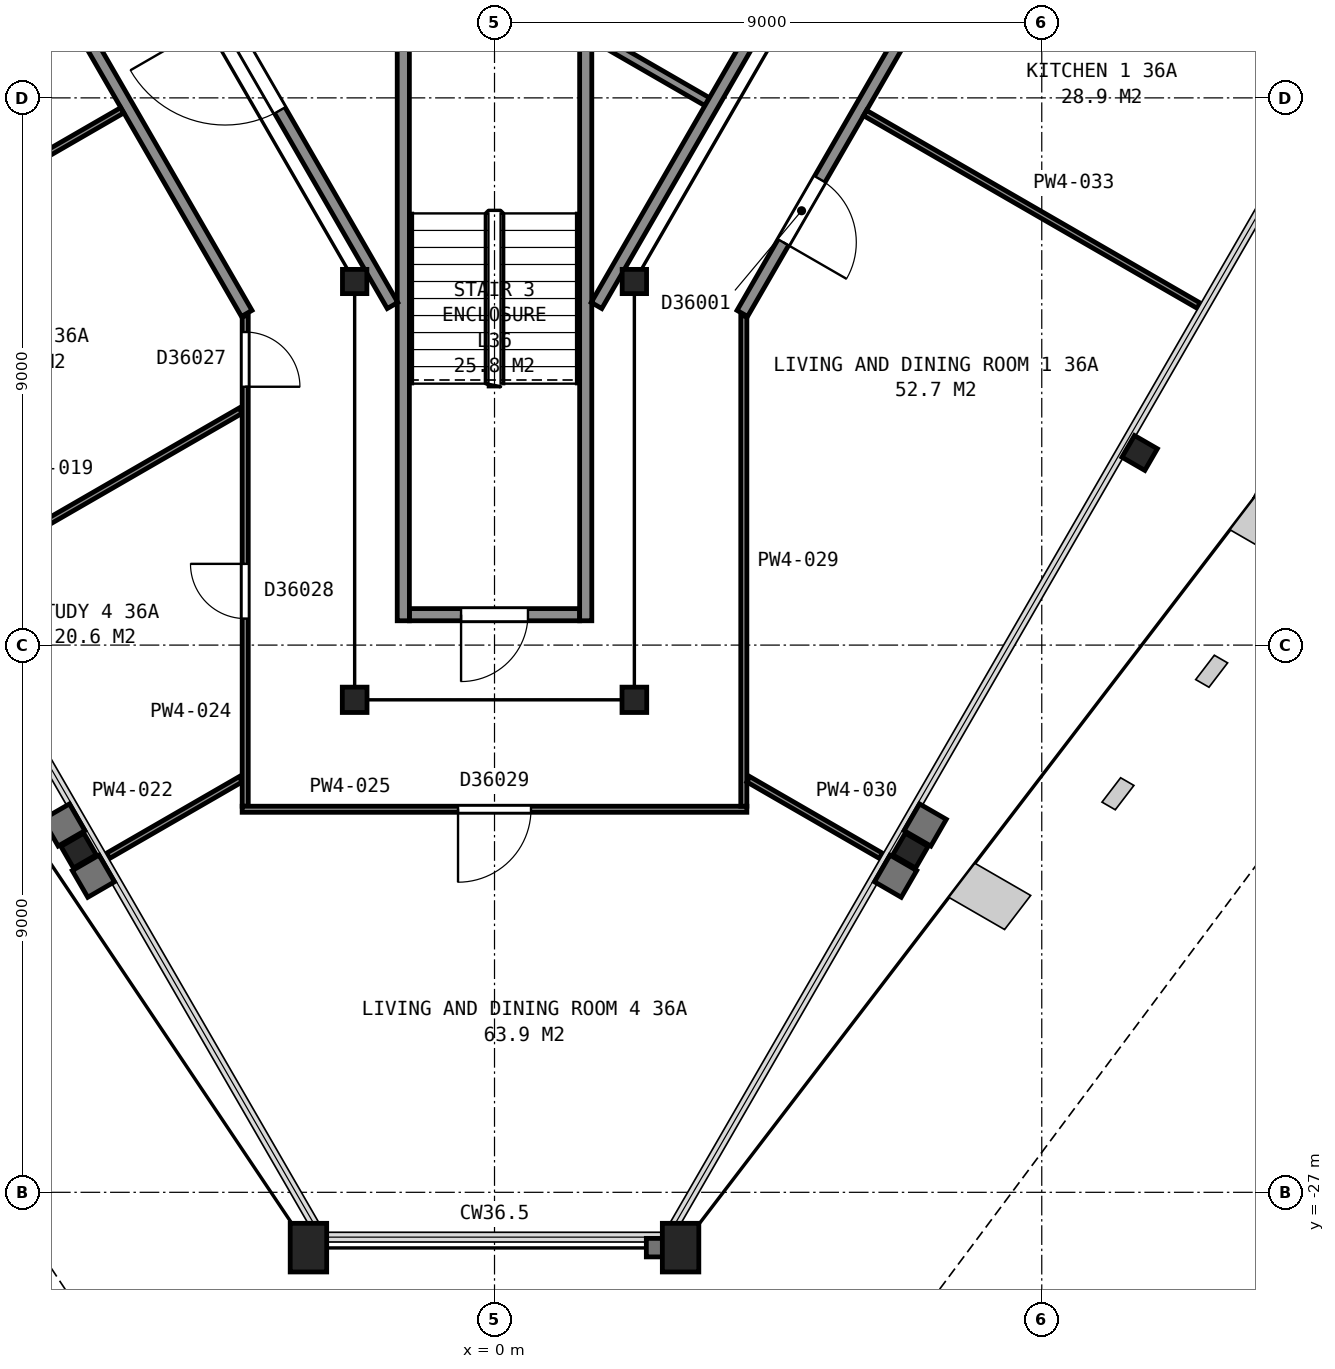
"""IFC4 building model, lengths in metres.
Left out: names, types, materials, properties, quantities, classifications, styles, units other than length and angle.
Written with IfcOpenShell. Run it as: python <this file> out.ifc"""

import sys

from ifc_helpers import new_model, si_unit, direction, frame, frame_2d, origin, origin_2d, place, context, subcontext, project, spatial, rectangle, hollow_rectangle, i_section, extrude, element, fill, save


model = new_model("IFC4")
c1 = context("Model", 3, precision=1e-05, world=origin(), true_north=direction((0.0, 1.0)))
c2 = subcontext(c1, "Body", "Model", "MODEL_VIEW")
j1 = project(units=[si_unit("LENGTHUNIT", "METRE"), si_unit("PLANEANGLEUNIT", "RADIAN")], contexts=[c1])
p1 = place(None, origin())
s1 = spatial("IfcSite", under=j1, at=p1, CompositionType="ELEMENT")
p2 = place(p1, origin())
s2 = spatial("IfcBuilding", under=s1, at=p2, CompositionType="ELEMENT")
p3 = place(p2, frame((0.0, 0.0, 148.8)))
s3 = spatial("IfcBuildingStorey", under=s2, at=p3, CompositionType="ELEMENT", Elevation=148.8)
p4 = place(p3, frame((-6.84, -21.38, 0.0), z_axis=(0.0, 0.0, 1.0), x_axis=(-0.5, 0.866025403784, 0.0)))
e1 = element("IfcColumn", 1, at=p4, inside=s3, PredefinedType="COLUMN", context=c2, shape_type="SweptSolid", body=[
    extrude(i_section(OverallWidth=0.411, OverallDepth=0.434, WebThickness=0.036, FlangeThickness=0.057, FilletRadius=0.015, at=origin_2d()), origin(), (0.0, 0.0, 1.0), 3.7),
])
for number, where, z_axis, x_axis in (
    (2, (-3.06, -27.91, 0.0), (0.0, 0.0, 1.0), (-1.0, 0.0, 0.0)),
    (3, (3.06, -27.91, 0.0), (0.0, 0.0, 1.0), (-1.0, 0.0, 0.0)),
):
    element("IfcColumn", number, at=place(p3, frame(where, z_axis=z_axis, x_axis=x_axis)), inside=s3, PredefinedType="COLUMN", context=c2, shape_type="SweptSolid", body=[
        extrude(hollow_rectangle(XDim=0.6, YDim=0.8, WallThickness=0.05, at=origin_2d()), origin(), (0.0, 0.0, 1.0), 3.7),
    ])
for number, where, z_axis, x_axis in (
    (4, (6.84, -21.38, 0.0), (0.0, 0.0, 1.0), (-0.5, -0.866, 0.0)),
    (5, (10.61, -14.84, 0.0), (0.0, 0.0, 1.0), (-0.5, -0.866, 0.0)),
):
    element("IfcColumn", number, at=place(p3, frame(where, z_axis=z_axis, x_axis=x_axis)), inside=s3, PredefinedType="COLUMN", context=c2, shape_type="SweptSolid", body=[
        extrude(i_section(OverallWidth=0.411, OverallDepth=0.434, WebThickness=0.036, FlangeThickness=0.057, FilletRadius=0.015, at=origin_2d()), origin(), (0.0, 0.0, 1.0), 3.7),
    ])
p5 = place(p3, frame((-2.3, -12.02, 0.05), z_axis=(0.0, 0.0, 1.0), x_axis=(1.0, 0.0, 0.0)))
e6 = element("IfcColumn", 6, at=p5, inside=s3, PredefinedType="COLUMN", context=c2, shape_type="SweptSolid", body=[
    extrude(i_section(OverallWidth=0.401, OverallDepth=0.399, WebThickness=0.025, FlangeThickness=0.04, FilletRadius=0.015, at=origin_2d()), origin(), (0.0, 0.0, 1.0), 3.65),
])
for number, where, z_axis, x_axis in (
    (7, (-2.3, -18.9, 0.055), (0.0, 0.0, 1.0), (-1.0, 0.0, 0.0)),
    (8, (2.3, -18.9, 0.055), (0.0, 0.0, 1.0), (-1.0, 0.0, 0.0)),
):
    element("IfcColumn", number, at=place(p3, frame(where, z_axis=z_axis, x_axis=x_axis)), inside=s3, PredefinedType="COLUMN", context=c2, shape_type="SweptSolid", body=[
        extrude(i_section(OverallWidth=0.406, OverallDepth=0.417, WebThickness=0.03, FlangeThickness=0.048, FilletRadius=0.015, at=origin_2d()), origin(), (0.0, 0.0, 1.0), 3.645),
    ])
p6 = place(p3, frame((2.3, -12.02, 0.05), z_axis=(0.0, 0.0, 1.0), x_axis=(1.0, 0.0, 0.0)))
e9 = element("IfcColumn", 9, at=p6, inside=s3, PredefinedType="COLUMN", context=c2, shape_type="SweptSolid", body=[
    extrude(i_section(OverallWidth=0.401, OverallDepth=0.399, WebThickness=0.025, FlangeThickness=0.04, FilletRadius=0.015, at=origin_2d()), origin(), (0.0, 0.0, 1.0), 3.65),
])
p7 = place(p3, frame((-1.4, -17.5, 0.0), z_axis=(0.0, 0.0, 1.0), x_axis=(1.0, 0.0, 0.0)))
e10 = element("IfcWall", 10, at=p7, inside=s3, PredefinedType="PARTITIONING", context=c2, shape_type="SweptSolid", body=[
    extrude(rectangle(XDim=2.8, YDim=0.2, at=frame_2d((1.4, 0.0))), origin(), (0.0, 0.0, 1.0), 3.45),
])
p8 = place(p7, frame((0.85, 0.0, 0.0)))
e11 = element("IfcOpeningElement", 11, at=p8, cuts=e10, PredefinedType="OPENING", context=c2, shape_type="SweptSolid", body=[
    extrude(rectangle(XDim=1.1, YDim=2.1, at=frame_2d((0.55, 1.05))), frame((0.0, 0.11, 0.0), z_axis=(0.0, -1.0, 0.0), x_axis=(1.0, 0.0, 0.0)), (0.0, 0.0, 1.0), 0.22),
])
for number, where, z_axis, x_axis in (
    (12, (1.5, -8.0, 0.0), (0.0, 0.0, 1.0), (0.0, -1.0, 0.0)),
    (13, (-1.5, -8.0, 0.0), (0.0, 0.0, 1.0), (0.0, -1.0, 0.0)),
):
    element("IfcWall", number, at=place(p3, frame(where, z_axis=z_axis, x_axis=x_axis)), inside=s3, PredefinedType="PARTITIONING", context=c2, shape_type="SweptSolid", body=[
        extrude(rectangle(XDim=9.6, YDim=0.2, at=frame_2d((4.8, 0.0))), origin(), (0.0, 0.0, 1.0), 3.45),
    ])
p9 = place(p3, frame((-4.655, -7.257, 0.0), z_axis=(0.0, 0.0, 1.0), x_axis=(0.499966124405, -0.866044960985, 0.0)))
e14 = element("IfcWall", 14, at=p9, inside=s3, PredefinedType="PARTITIONING", context=c2, shape_type="SweptSolid", body=[
    extrude(rectangle(XDim=5.956, YDim=0.2, at=frame_2d((2.978, 0.0))), origin(), (0.0, 0.0, 1.0), 3.45),
])
p10 = place(p9, frame((0.45, 0.0, 0.0)))
e15 = element("IfcOpeningElement", 15, at=p10, cuts=e14, PredefinedType="OPENING", context=c2, shape_type="SweptSolid", body=[
    extrude(rectangle(XDim=1.8, YDim=2.1, at=frame_2d((0.9, 1.05))), frame((0.0, 0.11, 0.0), z_axis=(0.0, -1.0, 0.0), x_axis=(1.0, 0.0, 0.0)), (0.0, 0.0, 1.0), 0.22),
])
p11 = place(p3, frame((1.631, -7.986, 0.0), z_axis=(0.0, 0.0, 1.0), x_axis=(0.866038426532, -0.499977443261, 0.0)))
e16 = element("IfcWall", 16, at=p11, inside=s3, PredefinedType="PARTITIONING", context=c2, shape_type="SweptSolid", body=[
    extrude(rectangle(XDim=2.155, YDim=0.15, at=frame_2d((1.077, 0.0))), origin(), (0.0, 0.0, 1.0), 3.45),
])
p12 = place(p3, frame((1.677, -12.415, 0.0), z_axis=(0.0, 0.0, 1.0), x_axis=(0.500054337157, 0.865994029939, 0.0)))
e17 = element("IfcWall", 17, at=p12, inside=s3, PredefinedType="PARTITIONING", context=c2, shape_type="SweptSolid", body=[
    extrude(rectangle(XDim=6.177, YDim=0.2, at=frame_2d((3.088, 0.0))), origin(), (0.0, 0.0, 1.0), 3.45),
])
p13 = place(p3, frame((-4.075, -12.545, 0.0), z_axis=(0.0, 0.0, 1.0), x_axis=(-0.499999743747, 0.866025551732, 0.0)))
e18 = element("IfcWall", 18, at=p13, inside=s3, PredefinedType="PARTITIONING", context=c2, shape_type="SweptSolid", body=[
    extrude(rectangle(XDim=17.656, YDim=0.2, at=frame_2d((8.828, 0.0))), origin(), (0.0, 0.0, 1.0), 2.713),
])
p14 = place(p13, frame((10.08, 0.0, 0.0)))
e19 = element("IfcOpeningElement", 19, at=p14, cuts=e18, PredefinedType="OPENING", context=c2, shape_type="SweptSolid", body=[
    extrude(rectangle(XDim=0.9, YDim=2.1, at=frame_2d((0.45, 1.05))), frame((0.0, 0.11, 0.0), z_axis=(0.0, -1.0, 0.0), x_axis=(1.0, 0.0, 0.0)), (0.0, 0.0, 1.0), 0.22),
])
p15 = place(p13, frame((6.068, 0.0, 0.0)))
e20 = element("IfcOpeningElement", 20, at=p15, cuts=e18, PredefinedType="OPENING", context=c2, shape_type="SweptSolid", body=[
    extrude(rectangle(XDim=0.9, YDim=2.1, at=frame_2d((0.45, 1.05))), frame((0.0, 0.11, 0.0), z_axis=(0.0, -1.0, 0.0), x_axis=(1.0, 0.0, 0.0)), (0.0, 0.0, 1.0), 0.22),
])
p16 = place(p3, frame((-11.605, -12.37, 0.0), z_axis=(0.0, 0.0, 1.0), x_axis=(0.866017278078, 0.500014073873, 0.0)))
e21 = element("IfcWall", 21, at=p16, inside=s3, PredefinedType="PARTITIONING", context=c2, shape_type="SweptSolid", body=[
    extrude(rectangle(XDim=6.329, YDim=0.1, at=frame_2d((3.165, 0.0))), origin(), (0.0, 0.0, 1.0), 2.713),
])
p17 = place(p3, frame((-8.979, -16.918, 0.0), z_axis=(0.0, 0.0, 1.0), x_axis=(0.866046339293, 0.499963736882, 0.0)))
e22 = element("IfcWall", 22, at=p17, inside=s3, PredefinedType="PARTITIONING", context=c2, shape_type="SweptSolid", body=[
    extrude(rectangle(XDim=5.547, YDim=0.1, at=frame_2d((2.774, 0.0))), origin(), (0.0, 0.0, 1.0), 2.713),
])
p18 = place(p3, frame((-6.354, -21.465, 0.0), z_axis=(0.0, 0.0, 1.0), x_axis=(0.866061165757, 0.499938053331, 0.0)))
e23 = element("IfcWall", 23, at=p18, inside=s3, PredefinedType="PARTITIONING", context=c2, shape_type="SweptSolid", body=[
    extrude(rectangle(XDim=2.516, YDim=0.1, at=frame_2d((1.258, 0.0))), origin(), (0.0, 0.0, 1.0), 2.713),
])
p19 = place(p3, frame((-4.1, -20.65, 0.0), z_axis=(0.0, 0.0, 1.0), x_axis=(0.0, 1.0, 0.0)))
e24 = element("IfcWall", 24, at=p19, inside=s3, PredefinedType="PARTITIONING", context=c2, shape_type="SweptSolid", body=[
    extrude(rectangle(XDim=8.063, YDim=0.1, at=frame_2d((4.031, 0.0))), origin(), (0.0, 0.0, 1.0), 2.713),
])
p20 = place(p19, frame((6.899, 0.0, 0.0)))
e25 = element("IfcOpeningElement", 25, at=p20, cuts=e24, PredefinedType="OPENING", context=c2, shape_type="SweptSolid", body=[
    extrude(rectangle(XDim=0.9, YDim=2.1, at=frame_2d((0.45, 1.05))), frame((0.0, 0.06, 0.0), z_axis=(0.0, -1.0, 0.0), x_axis=(1.0, 0.0, 0.0)), (0.0, 0.0, 1.0), 0.12),
])
p21 = place(p19, frame((3.086, 0.0, 0.0)))
e26 = element("IfcOpeningElement", 26, at=p21, cuts=e24, PredefinedType="OPENING", context=c2, shape_type="SweptSolid", body=[
    extrude(rectangle(XDim=0.9, YDim=2.1, at=frame_2d((0.45, 1.05))), frame((0.0, 0.06, 0.0), z_axis=(0.0, -1.0, 0.0), x_axis=(1.0, 0.0, 0.0)), (0.0, 0.0, 1.0), 0.12),
])
p22 = place(p3, frame((4.15, -20.7, 0.0), z_axis=(0.0, 0.0, 1.0), x_axis=(-1.0, 0.0, 0.0)))
e27 = element("IfcWall", 27, at=p22, inside=s3, PredefinedType="PARTITIONING", context=c2, shape_type="SweptSolid", body=[
    extrude(rectangle(XDim=8.3, YDim=0.1, at=frame_2d((4.15, 0.0))), origin(), (0.0, 0.0, 1.0), 2.713),
])
p23 = place(p22, frame((3.55, 0.0, 0.0)))
e28 = element("IfcOpeningElement", 28, at=p23, cuts=e27, PredefinedType="OPENING", context=c2, shape_type="SweptSolid", body=[
    extrude(rectangle(XDim=1.2, YDim=2.1, at=frame_2d((0.6, 1.05))), frame((0.0, 0.06, 0.0), z_axis=(0.0, -1.0, 0.0), x_axis=(1.0, 0.0, 0.0)), (0.0, 0.0, 1.0), 0.12),
])
p24 = place(p3, frame((4.1, -20.65, 0.0), z_axis=(0.0, 0.0, 1.0), x_axis=(0.0, 1.0, 0.0)))
e29 = element("IfcWall", 29, at=p24, inside=s3, PredefinedType="PARTITIONING", context=c2, shape_type="SweptSolid", body=[
    extrude(rectangle(XDim=8.063, YDim=0.1, at=frame_2d((4.031, 0.0))), origin(), (0.0, 0.0, 1.0), 2.713),
])
p25 = place(p3, frame((4.175, -20.207, 0.0), z_axis=(0.0, 0.0, 1.0), x_axis=(0.866061165757, -0.499938053331, 0.0)))
e30 = element("IfcWall", 30, at=p25, inside=s3, PredefinedType="PARTITIONING", context=c2, shape_type="SweptSolid", body=[
    extrude(rectangle(XDim=2.516, YDim=0.1, at=frame_2d((1.258, 0.0))), origin(), (0.0, 0.0, 1.0), 2.713),
])
p26 = place(p3, frame((12.928, 2.789, 0.0), z_axis=(0.0, 0.0, 1.0), x_axis=(-0.499997769292, -0.86602669168, 0.0)))
e31 = element("IfcWall", 31, at=p26, inside=s3, PredefinedType="PARTITIONING", context=c2, shape_type="SweptSolid", body=[
    extrude(rectangle(XDim=17.706, YDim=0.2, at=frame_2d((8.853, 0.0))), origin(), (0.0, 0.0, 1.0), 2.713),
])
p27 = place(p26, frame((15.156, 0.0, 0.0)))
e32 = element("IfcOpeningElement", 32, at=p27, cuts=e31, PredefinedType="OPENING", context=c2, shape_type="SweptSolid", body=[
    extrude(rectangle(XDim=1.2, YDim=2.1, at=frame_2d((0.6, 1.05))), frame((0.0, 0.11, 0.0), z_axis=(0.0, -1.0, 0.0), x_axis=(1.0, 0.0, 0.0)), (0.0, 0.0, 1.0), 0.22),
])
p28 = place(p26, frame((11.042, 0.0, 0.0)))
e33 = element("IfcOpeningElement", 33, at=p28, cuts=e31, PredefinedType="OPENING", context=c2, shape_type="SweptSolid", body=[
    extrude(rectangle(XDim=0.9, YDim=2.1, at=frame_2d((0.45, 1.05))), frame((0.0, 0.11, 0.0), z_axis=(0.0, -1.0, 0.0), x_axis=(1.0, 0.0, 0.0)), (0.0, 0.0, 1.0), 0.22),
])
p29 = place(p26, frame((7.14, 0.0, 0.0)))
e34 = element("IfcOpeningElement", 34, at=p29, cuts=e31, PredefinedType="OPENING", context=c2, shape_type="SweptSolid", body=[
    extrude(rectangle(XDim=0.9, YDim=2.1, at=frame_2d((0.45, 1.05))), frame((0.0, 0.11, 0.0), z_axis=(0.0, -1.0, 0.0), x_axis=(1.0, 0.0, 0.0)), (0.0, 0.0, 1.0), 0.22),
])
p30 = place(p26, frame((0.515, 0.0, 0.0)))
e35 = element("IfcOpeningElement", 35, at=p30, cuts=e31, PredefinedType="OPENING", context=c2, shape_type="SweptSolid", body=[
    extrude(rectangle(XDim=0.9, YDim=2.1, at=frame_2d((0.45, 1.05))), frame((0.0, 0.11, 0.0), z_axis=(0.0, -1.0, 0.0), x_axis=(1.0, 0.0, 0.0)), (0.0, 0.0, 1.0), 0.22),
])
for number, where, z_axis, x_axis in (
    (36, (6.094, -9.249, 0.0), (0.0, 0.0, 1.0), (0.866, -0.5, 0.0)),
    (37, (8.445, -5.177, 0.0), (0.0, 0.0, 1.0), (0.866, -0.5, 0.0)),
):
    element("IfcWall", number, at=place(p3, frame(where, z_axis=z_axis, x_axis=x_axis)), inside=s3, PredefinedType="PARTITIONING", context=c2, shape_type="SweptSolid", body=[
        extrude(rectangle(XDim=6.333, YDim=0.1, at=frame_2d((3.167, 0.0))), origin(), (0.0, 0.0, 1.0), 2.713),
    ])
p31 = place(p8, origin())
e38 = element("IfcDoor", 38, at=p31, inside=s3, OperationType="SINGLE_SWING_LEFT", PredefinedType="DOOR", context=c2, shape_type="SweptSolid", body=[
    extrude(rectangle(XDim=1.1, YDim=2.1, at=frame_2d((0.55, 1.05))), frame((0.0, 0.025, 0.0), z_axis=(0.0, -1.0, 0.0), x_axis=(1.0, 0.0, 0.0)), (0.0, 0.0, 1.0), 0.05),
])
fill(e11, e38)
p32 = place(p10, origin())
e39 = element("IfcDoor", 39, at=p32, inside=s3, OperationType="DOUBLE_DOOR_SINGLE_SWING", PredefinedType="DOOR", context=c2, shape_type="SweptSolid", body=[
    extrude(rectangle(XDim=1.8, YDim=2.1, at=frame_2d((0.9, 1.05))), frame((0.0, 0.025, 0.0), z_axis=(0.0, -1.0, 0.0), x_axis=(1.0, 0.0, 0.0)), (0.0, 0.0, 1.0), 0.05),
])
fill(e15, e39)
p33 = place(p20, origin())
e40 = element("IfcDoor", 40, at=p33, inside=s3, OperationType="SINGLE_SWING_LEFT", PredefinedType="DOOR", context=c2, shape_type="SweptSolid", body=[
    extrude(rectangle(XDim=0.9, YDim=2.1, at=frame_2d((0.45, 1.05))), frame((0.0, 0.025, 0.0), z_axis=(0.0, -1.0, 0.0), x_axis=(1.0, 0.0, 0.0)), (0.0, 0.0, 1.0), 0.05),
])
fill(e25, e40)
p34 = place(p21, origin())
e41 = element("IfcDoor", 41, at=p34, inside=s3, OperationType="SINGLE_SWING_RIGHT", PredefinedType="DOOR", context=c2, shape_type="SweptSolid", body=[
    extrude(rectangle(XDim=0.9, YDim=2.1, at=frame_2d((0.45, 1.05))), frame((0.0, 0.025, 0.0), z_axis=(0.0, -1.0, 0.0), x_axis=(1.0, 0.0, 0.0)), (0.0, 0.0, 1.0), 0.05),
])
fill(e26, e41)
p35 = place(p23, origin())
e42 = element("IfcDoor", 42, at=p35, inside=s3, OperationType="SINGLE_SWING_RIGHT", PredefinedType="DOOR", context=c2, shape_type="SweptSolid", body=[
    extrude(rectangle(XDim=1.2, YDim=2.1, at=frame_2d((0.6, 1.05))), frame((0.0, 0.025, 0.0), z_axis=(0.0, -1.0, 0.0), x_axis=(1.0, 0.0, 0.0)), (0.0, 0.0, 1.0), 0.05),
])
fill(e28, e42)
p36 = place(p27, origin())
e43 = element("IfcDoor", 43, at=p36, inside=s3, OperationType="SINGLE_SWING_RIGHT", PredefinedType="DOOR", context=c2, shape_type="SweptSolid", body=[
    extrude(rectangle(XDim=1.2, YDim=2.1, at=frame_2d((0.6, 1.05))), frame((0.0, 0.025, 0.0), z_axis=(0.0, -1.0, 0.0), x_axis=(1.0, 0.0, 0.0)), (0.0, 0.0, 1.0), 0.05),
])
fill(e32, e43)
save(model, sys.argv[1])
